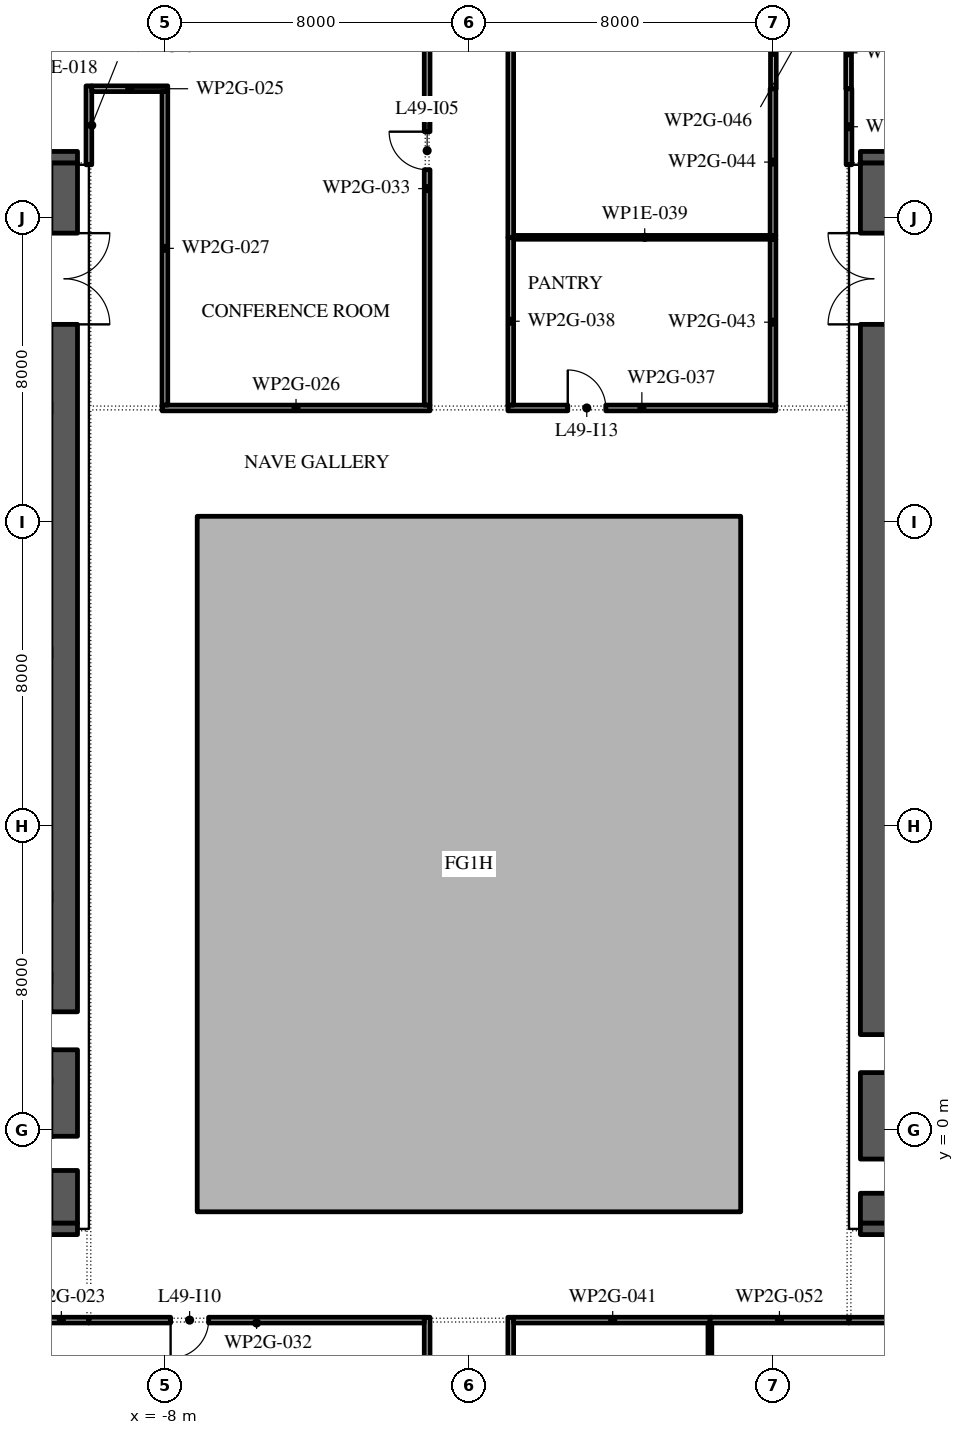
"""IFC4 building model, lengths in metres.
Left out: names, types, materials, properties, quantities, classifications, styles, units other than length and angle.
Written with IfcOpenShell. Run it as: python <this file> out.ifc"""

import sys

from ifc_helpers import new_model, si_unit, direction, frame, frame_2d, origin, place, context, subcontext, project, spatial, polyline, rectangle, outline, extrude, element, fill, save


model = new_model("IFC4")
c1 = context("Model", 3, precision=1e-05, world=origin(), true_north=direction((0.0, 1.0)))
c2 = subcontext(c1, "Body", "Model", "MODEL_VIEW")
j1 = project(units=[si_unit("LENGTHUNIT", "METRE"), si_unit("PLANEANGLEUNIT", "RADIAN")], contexts=[c1])
p1 = place(None, origin())
s1 = spatial("IfcSite", under=j1, at=p1, CompositionType="ELEMENT")
p2 = place(p1, origin())
s2 = spatial("IfcBuilding", under=s1, at=p2, CompositionType="ELEMENT")
p3 = place(p2, frame((0.0, 0.0, 222.0)))
s3 = spatial("IfcBuildingStorey", under=s2, at=p3, CompositionType="ELEMENT", Elevation=222.0)
p4 = place(p3, origin())
e1 = element("IfcWall", 1, at=p4, inside=s3, PredefinedType="STANDARD", context=c2, shape_type="SweptSolid", body=[
    extrude(outline(polyline([(-7.15, -2.15), (7.15, -2.15), (7.15, 16.15), (-7.15, 16.15), (-7.15, -2.15)]), holes=[polyline([(-7.0, -2.0), (-7.0, 16.0), (7.0, 16.0), (7.0, -2.0), (-7.0, -2.0)])]), origin(), (0.0, 0.0, 1.0), 3.75),
])
p5 = place(p3, frame((-10.65, -2.45, 0.0), z_axis=(0.0, 0.0, 1.0), x_axis=(0.0, 1.0, 0.0)))
e2 = element("IfcWall", 2, at=p5, inside=s3, PredefinedType="SHEAR", context=c2, shape_type="SweptSolid", body=[
    extrude(rectangle(XDim=27.9, YDim=0.7, at=frame_2d((13.95, 0.0))), origin(), (0.0, 0.0, 1.0), 3.75),
])
p6 = place(p5, frame((23.65, 0.0, 0.0)))
e3 = element("IfcOpeningElement", 3, at=p6, cuts=e2, PredefinedType="OPENING", context=c2, shape_type="SweptSolid", body=[
    extrude(rectangle(XDim=2.4, YDim=2.1, at=frame_2d((1.2, 1.05))), frame((0.0, 0.36, 0.0), z_axis=(0.0, -1.0, 0.0), x_axis=(1.0, 0.0, 0.0)), (0.0, 0.0, 1.0), 0.72),
])
p7 = place(p5, frame((1.387, 0.0, 0.0)))
e4 = element("IfcOpeningElement", 4, at=p7, cuts=e2, PredefinedType="OPENING", context=c2, shape_type="SweptSolid", body=[
    extrude(rectangle(XDim=0.9, YDim=2.1, at=frame_2d((0.45, 1.05))), frame((0.0, 0.36, 0.0), z_axis=(0.0, -1.0, 0.0), x_axis=(1.0, 0.0, 0.0)), (0.0, 0.0, 1.0), 0.72),
])
p8 = place(p5, frame((4.562, 0.0, 0.0)))
e5 = element("IfcOpeningElement", 5, at=p8, cuts=e2, PredefinedType="OPENING", context=c2, shape_type="SweptSolid", body=[
    extrude(rectangle(XDim=1.0, YDim=2.1, at=frame_2d((0.5, 1.05))), frame((0.0, 0.36, 0.0), z_axis=(0.0, -1.0, 0.0), x_axis=(1.0, 0.0, 0.0)), (0.0, 0.0, 1.0), 0.72),
])
for number, where, z_axis, x_axis in (
    (6, (-21.7, -2.6, 0.0), (0.0, 0.0, 1.0), (1.0, 0.0, 0.0)),
    (7, (-21.7, 25.6, 0.0), (0.0, 0.0, 1.0), (1.0, 0.0, 0.0)),
):
    element("IfcWall", number, at=place(p3, frame(where, z_axis=z_axis, x_axis=x_axis)), inside=s3, PredefinedType="SHEAR", context=c2, shape_type="SweptSolid", body=[
        extrude(rectangle(XDim=11.4, YDim=0.3, at=frame_2d((5.7, 0.0))), origin(), (0.0, 0.0, 1.0), 3.75),
    ])
p9 = place(p3, frame((10.65, -2.45, 0.0), z_axis=(0.0, 0.0, 1.0), x_axis=(0.0, 1.0, 0.0)))
e8 = element("IfcWall", 8, at=p9, inside=s3, PredefinedType="SHEAR", context=c2, shape_type="SweptSolid", body=[
    extrude(rectangle(XDim=27.9, YDim=0.7, at=frame_2d((13.95, 0.0))), origin(), (0.0, 0.0, 1.0), 3.75),
])
p10 = place(p9, frame((23.65, 0.0, 0.0)))
e9 = element("IfcOpeningElement", 9, at=p10, cuts=e8, PredefinedType="OPENING", context=c2, shape_type="SweptSolid", body=[
    extrude(rectangle(XDim=2.4, YDim=2.1, at=frame_2d((1.2, 1.05))), frame((0.0, 0.36, 0.0), z_axis=(0.0, -1.0, 0.0), x_axis=(1.0, 0.0, 0.0)), (0.0, 0.0, 1.0), 0.72),
])
p11 = place(p9, frame((0.788, 0.0, 0.0)))
e10 = element("IfcOpeningElement", 10, at=p11, cuts=e8, PredefinedType="OPENING", context=c2, shape_type="SweptSolid", body=[
    extrude(rectangle(XDim=0.9, YDim=2.1, at=frame_2d((0.45, 1.05))), frame((0.0, 0.36, 0.0), z_axis=(0.0, -1.0, 0.0), x_axis=(1.0, 0.0, 0.0)), (0.0, 0.0, 1.0), 0.72),
])
p12 = place(p9, frame((3.962, 0.0, 0.0)))
e11 = element("IfcOpeningElement", 11, at=p12, cuts=e8, PredefinedType="OPENING", context=c2, shape_type="SweptSolid", body=[
    extrude(rectangle(XDim=1.0, YDim=2.1, at=frame_2d((0.5, 1.05))), frame((0.0, 0.36, 0.0), z_axis=(0.0, -1.0, 0.0), x_axis=(1.0, 0.0, 0.0)), (0.0, 0.0, 1.0), 0.72),
])
for number, where, z_axis, x_axis in (
    (12, (10.3, -2.6, 0.0), (0.0, 0.0, 1.0), (1.0, 0.0, 0.0)),
    (13, (10.3, 25.6, 0.0), (0.0, 0.0, 1.0), (1.0, 0.0, 0.0)),
):
    element("IfcWall", number, at=place(p3, frame(where, z_axis=z_axis, x_axis=x_axis)), inside=s3, PredefinedType="SHEAR", context=c2, shape_type="SweptSolid", body=[
        extrude(rectangle(XDim=11.4, YDim=0.3, at=frame_2d((5.7, 0.0))), origin(), (0.0, 0.0, 1.0), 3.75),
    ])
p13 = place(p3, frame((-10.0, -5.0, 0.0), z_axis=(0.0, 0.0, 1.0), x_axis=(-1.0, 0.0, 0.0)))
e14 = element("IfcWall", 14, at=p13, inside=s3, PredefinedType="PARTITIONING", context=c2, shape_type="SweptSolid", body=[
    extrude(rectangle(XDim=1.45, YDim=0.15, at=frame_2d((0.725, 0.0))), origin(), (0.0, 0.0, 1.0), 3.75),
])
p14 = place(p3, frame((-10.0, 25.4, 0.0), z_axis=(0.0, 0.0, 1.0), x_axis=(0.0, 1.0, 0.0)))
e15 = element("IfcWall", 15, at=p14, inside=s3, PredefinedType="PARTITIONING", context=c2, shape_type="SweptSolid", body=[
    extrude(rectangle(XDim=2.075, YDim=0.15, at=frame_2d((1.038, 0.0))), origin(), (0.0, 0.0, 1.0), 3.75),
])
p15 = place(p3, frame((-9.925, 27.4, 0.0), z_axis=(0.0, 0.0, 1.0), x_axis=(1.0, 0.0, 0.0)))
e16 = element("IfcWall", 16, at=p15, inside=s3, PredefinedType="PARTITIONING", context=c2, shape_type="SweptSolid", body=[
    extrude(rectangle(XDim=2.0, YDim=0.15, at=frame_2d((1.0, 0.0))), origin(), (0.0, 0.0, 1.0), 3.75),
])
p16 = place(p3, frame((-8.075, 19.0, 0.0), z_axis=(0.0, 0.0, 1.0), x_axis=(1.0, 0.0, 0.0)))
e17 = element("IfcWall", 17, at=p16, inside=s3, PredefinedType="PARTITIONING", context=c2, shape_type="SweptSolid", body=[
    extrude(rectangle(XDim=7.05, YDim=0.15, at=frame_2d((3.525, 0.0))), origin(), (0.0, 0.0, 1.0), 3.75),
])
p17 = place(p3, frame((-8.0, 27.325, 0.0), z_axis=(0.0, 0.0, 1.0), x_axis=(0.0, -1.0, 0.0)))
e18 = element("IfcWall", 18, at=p17, inside=s3, PredefinedType="PARTITIONING", context=c2, shape_type="SweptSolid", body=[
    extrude(rectangle(XDim=8.25, YDim=0.15, at=frame_2d((4.125, 0.0))), origin(), (0.0, 0.0, 1.0), 3.75),
])
p18 = place(p3, frame((-1.1, -13.45, 0.0), z_axis=(0.0, 0.0, 1.0), x_axis=(0.0, 1.0, 0.0)))
e19 = element("IfcWall", 19, at=p18, inside=s3, PredefinedType="PARTITIONING", context=c2, shape_type="SweptSolid", body=[
    extrude(rectangle(XDim=8.525, YDim=0.15, at=frame_2d((4.262, 0.0))), origin(), (0.0, 0.0, 1.0), 3.75),
])
p19 = place(p3, frame((-1.175, -5.0, 0.0), z_axis=(0.0, 0.0, 1.0), x_axis=(-1.0, 0.0, 0.0)))
e20 = element("IfcWall", 20, at=p19, inside=s3, PredefinedType="PARTITIONING", context=c2, shape_type="SweptSolid", body=[
    extrude(rectangle(XDim=8.825, YDim=0.15, at=frame_2d((4.413, 0.0))), origin(), (0.0, 0.0, 1.0), 3.75),
])
p20 = place(p19, frame((5.675, 0.0, 0.0)))
e21 = element("IfcOpeningElement", 21, at=p20, cuts=e20, PredefinedType="OPENING", context=c2, shape_type="SweptSolid", body=[
    extrude(rectangle(XDim=1.0, YDim=2.1, at=frame_2d((0.5, 1.05))), frame((0.0, 0.085, 0.0), z_axis=(0.0, -1.0, 0.0), x_axis=(1.0, 0.0, 0.0)), (0.0, 0.0, 1.0), 0.17),
])
p21 = place(p3, frame((-1.1, 19.075, 0.0), z_axis=(0.0, 0.0, 1.0), x_axis=(0.0, 1.0, 0.0)))
e22 = element("IfcWall", 22, at=p21, inside=s3, PredefinedType="PARTITIONING", context=c2, shape_type="SweptSolid", body=[
    extrude(rectangle(XDim=11.395, YDim=0.15, at=frame_2d((5.698, 0.0))), origin(), (0.0, 0.0, 1.0), 3.75),
])
p22 = place(p21, frame((6.195, 0.0, 0.0)))
e23 = element("IfcOpeningElement", 23, at=p22, cuts=e22, PredefinedType="OPENING", context=c2, shape_type="SweptSolid", body=[
    extrude(rectangle(XDim=1.0, YDim=2.1, at=frame_2d((0.5, 1.05))), frame((0.0, 0.085, 0.0), z_axis=(0.0, -1.0, 0.0), x_axis=(1.0, 0.0, 0.0)), (0.0, 0.0, 1.0), 0.17),
])
p23 = place(p3, frame((1.1, -4.925, 0.0), z_axis=(0.0, 0.0, 1.0), x_axis=(0.0, -1.0, 0.0)))
e24 = element("IfcWall", 24, at=p23, inside=s3, PredefinedType="PARTITIONING", context=c2, shape_type="SweptSolid", body=[
    extrude(rectangle(XDim=11.345, YDim=0.15, at=frame_2d((5.672, 0.0))), origin(), (0.0, 0.0, 1.0), 3.75),
])
p24 = place(p23, frame((6.425, 0.0, 0.0)))
e25 = element("IfcOpeningElement", 25, at=p24, cuts=e24, PredefinedType="OPENING", context=c2, shape_type="SweptSolid", body=[
    extrude(rectangle(XDim=1.0, YDim=2.1, at=frame_2d((0.5, 1.05))), frame((0.0, 0.085, 0.0), z_axis=(0.0, -1.0, 0.0), x_axis=(1.0, 0.0, 0.0)), (0.0, 0.0, 1.0), 0.17),
])
p25 = place(p3, frame((1.025, 19.0, 0.0), z_axis=(0.0, 0.0, 1.0), x_axis=(1.0, 0.0, 0.0)))
e26 = element("IfcWall", 26, at=p25, inside=s3, PredefinedType="PARTITIONING", context=c2, shape_type="SweptSolid", body=[
    extrude(rectangle(XDim=7.05, YDim=0.15, at=frame_2d((3.525, 0.0))), origin(), (0.0, 0.0, 1.0), 3.75),
])
p26 = place(p25, frame((1.575, 0.0, 0.0)))
e27 = element("IfcOpeningElement", 27, at=p26, cuts=e26, PredefinedType="OPENING", context=c2, shape_type="SweptSolid", body=[
    extrude(rectangle(XDim=1.0, YDim=2.1, at=frame_2d((0.5, 1.05))), frame((0.0, 0.085, 0.0), z_axis=(0.0, -1.0, 0.0), x_axis=(1.0, 0.0, 0.0)), (0.0, 0.0, 1.0), 0.17),
])
p27 = place(p3, frame((1.1, 23.49, 0.0), z_axis=(0.0, 0.0, 1.0), x_axis=(0.0, -1.0, 0.0)))
e28 = element("IfcWall", 28, at=p27, inside=s3, PredefinedType="PARTITIONING", context=c2, shape_type="SweptSolid", body=[
    extrude(rectangle(XDim=4.415, YDim=0.15, at=frame_2d((2.208, 0.0))), origin(), (0.0, 0.0, 1.0), 3.75),
])
p28 = place(p3, frame((1.175, 23.49, 0.0), z_axis=(0.0, 0.0, 1.0), x_axis=(1.0, 0.0, 0.0)))
e29 = element("IfcWall", 29, at=p28, inside=s3, PredefinedType="PARTITIONING", context=c2, shape_type="SweptSolid", body=[
    extrude(rectangle(XDim=6.9, YDim=0.1, at=frame_2d((3.45, 0.0))), origin(), (0.0, 0.0, 1.0), 3.75),
])
p29 = place(p3, frame((1.1, 41.778, 0.0), z_axis=(0.0, 0.0, 1.0), x_axis=(0.0, -1.0, 0.0)))
e30 = element("IfcWall", 30, at=p29, inside=s3, PredefinedType="PARTITIONING", context=c2, shape_type="SweptSolid", body=[
    extrude(rectangle(XDim=18.288, YDim=0.15, at=frame_2d((9.144, 0.0))), origin(), (0.0, 0.0, 1.0), 3.75),
])
p30 = place(p29, frame((10.388, 0.0, 0.0)))
e31 = element("IfcOpeningElement", 31, at=p30, cuts=e30, PredefinedType="OPENING", context=c2, shape_type="SweptSolid", body=[
    extrude(rectangle(XDim=1.0, YDim=2.1, at=frame_2d((0.5, 1.05))), frame((0.0, 0.085, 0.0), z_axis=(0.0, -1.0, 0.0), x_axis=(1.0, 0.0, 0.0)), (0.0, 0.0, 1.0), 0.17),
])
p31 = place(p3, frame((6.39, -5.0, 0.0), z_axis=(0.0, 0.0, 1.0), x_axis=(-1.0, 0.0, 0.0)))
e32 = element("IfcWall", 32, at=p31, inside=s3, PredefinedType="PARTITIONING", context=c2, shape_type="SweptSolid", body=[
    extrude(rectangle(XDim=5.215, YDim=0.15, at=frame_2d((2.607, 0.0))), origin(), (0.0, 0.0, 1.0), 3.75),
])
p32 = place(p3, frame((6.34, -5.075, 0.0), z_axis=(0.0, 0.0, 1.0), x_axis=(0.0, -1.0, 0.0)))
e33 = element("IfcWall", 33, at=p32, inside=s3, PredefinedType="PARTITIONING", context=c2, shape_type="SweptSolid", body=[
    extrude(rectangle(XDim=9.986, YDim=0.1, at=frame_2d((4.993, 0.0))), origin(), (0.0, 0.0, 1.0), 3.75),
])
p33 = place(p3, frame((8.0, 19.075, 0.0), z_axis=(0.0, 0.0, 1.0), x_axis=(0.0, 1.0, 0.0)))
e34 = element("IfcWall", 34, at=p33, inside=s3, PredefinedType="PARTITIONING", context=c2, shape_type="SweptSolid", body=[
    extrude(rectangle(XDim=4.365, YDim=0.15, at=frame_2d((2.183, 0.0))), origin(), (0.0, 0.0, 1.0), 3.75),
])
p34 = place(p3, frame((8.0, 23.54, 0.0), z_axis=(0.0, 0.0, 1.0), x_axis=(0.0, 1.0, 0.0)))
e35 = element("IfcWall", 35, at=p34, inside=s3, PredefinedType="PARTITIONING", context=c2, shape_type="SweptSolid", body=[
    extrude(rectangle(XDim=3.86, YDim=0.15, at=frame_2d((1.93, 0.0))), origin(), (0.0, 0.0, 1.0), 3.75),
])
p35 = place(p3, frame((8.01, 27.4, 0.0), z_axis=(0.0, 0.0, 1.0), x_axis=(0.0, 1.0, 0.0)))
e36 = element("IfcWall", 36, at=p35, inside=s3, PredefinedType="PARTITIONING", context=c2, shape_type="SweptSolid", body=[
    extrude(rectangle(XDim=1.915, YDim=0.15, at=frame_2d((0.958, 0.0))), origin(), (0.0, 0.0, 1.0), 3.75),
])
p36 = place(p3, frame((9.99, 29.29, 0.0), z_axis=(0.0, 0.0, 1.0), x_axis=(0.0, -1.0, 0.0)))
e37 = element("IfcWall", 37, at=p36, inside=s3, PredefinedType="PARTITIONING", context=c2, shape_type="SweptSolid", body=[
    extrude(rectangle(XDim=1.89, YDim=0.15, at=frame_2d((0.945, 0.0))), origin(), (0.0, 0.0, 1.0), 3.75),
])
p37 = place(p3, frame((10.0, -5.0, 0.0), z_axis=(0.0, 0.0, 1.0), x_axis=(-1.0, 0.0, 0.0)))
e38 = element("IfcWall", 38, at=p37, inside=s3, PredefinedType="PARTITIONING", context=c2, shape_type="SweptSolid", body=[
    extrude(rectangle(XDim=3.66, YDim=0.15, at=frame_2d((1.83, 0.0))), origin(), (0.0, 0.0, 1.0), 3.75),
])
p38 = place(p3, frame((10.0, 27.4, 0.0), z_axis=(0.0, 0.0, 1.0), x_axis=(0.0, -1.0, 0.0)))
e39 = element("IfcWall", 39, at=p38, inside=s3, PredefinedType="PARTITIONING", context=c2, shape_type="SweptSolid", body=[
    extrude(rectangle(XDim=2.0, YDim=0.15, at=frame_2d((1.0, 0.0))), origin(), (0.0, 0.0, 1.0), 3.75),
])
p39 = place(p3, frame((22.57, -5.0, 0.0), z_axis=(0.0, 0.0, 1.0), x_axis=(-1.0, 0.0, 0.0)))
e40 = element("IfcWall", 40, at=p39, inside=s3, PredefinedType="PARTITIONING", context=c2, shape_type="SweptSolid", body=[
    extrude(rectangle(XDim=12.57, YDim=0.15, at=frame_2d((6.285, 0.0))), origin(), (0.0, 0.0, 1.0), 3.75),
])
p40 = place(p39, frame((8.42, 0.0, 0.0)))
e41 = element("IfcOpeningElement", 41, at=p40, cuts=e40, PredefinedType="OPENING", context=c2, shape_type="SweptSolid", body=[
    extrude(rectangle(XDim=1.0, YDim=2.1, at=frame_2d((0.5, 1.05))), frame((0.0, 0.085, 0.0), z_axis=(0.0, -1.0, 0.0), x_axis=(1.0, 0.0, 0.0)), (0.0, 0.0, 1.0), 0.17),
])
p41 = place(p6, frame((2.4, 0.0, 0.0), z_axis=(0.0, 0.0, 1.0), x_axis=(-1.0, 0.0, 0.0)))
e42 = element("IfcDoor", 42, at=p41, inside=s3, OperationType="DOUBLE_DOOR_SINGLE_SWING", PredefinedType="DOOR", context=c2, shape_type="SweptSolid", body=[
    extrude(rectangle(XDim=2.4, YDim=2.1, at=frame_2d((1.2, 1.05))), frame((0.0, 0.025, 0.0), z_axis=(0.0, -1.0, 0.0), x_axis=(1.0, 0.0, 0.0)), (0.0, 0.0, 1.0), 0.05),
])
fill(e3, e42)
p42 = place(p10, origin())
e43 = element("IfcDoor", 43, at=p42, inside=s3, OperationType="DOUBLE_DOOR_SINGLE_SWING", PredefinedType="DOOR", context=c2, shape_type="SweptSolid", body=[
    extrude(rectangle(XDim=2.4, YDim=2.1, at=frame_2d((1.2, 1.05))), frame((0.0, 0.025, 0.0), z_axis=(0.0, -1.0, 0.0), x_axis=(1.0, 0.0, 0.0)), (0.0, 0.0, 1.0), 0.05),
])
fill(e9, e43)
p43 = place(p22, origin())
e44 = element("IfcDoor", 44, at=p43, inside=s3, OperationType="SINGLE_SWING_LEFT", PredefinedType="DOOR", context=c2, shape_type="SweptSolid", body=[
    extrude(rectangle(XDim=1.0, YDim=2.1, at=frame_2d((0.5, 1.05))), frame((0.0, 0.025, 0.0), z_axis=(0.0, -1.0, 0.0), x_axis=(1.0, 0.0, 0.0)), (0.0, 0.0, 1.0), 0.05),
])
fill(e23, e44)
p44 = place(p20, origin())
e45 = element("IfcDoor", 45, at=p44, inside=s3, OperationType="SINGLE_SWING_LEFT", PredefinedType="DOOR", context=c2, shape_type="SweptSolid", body=[
    extrude(rectangle(XDim=1.0, YDim=2.1, at=frame_2d((0.5, 1.05))), frame((0.0, 0.025, 0.0), z_axis=(0.0, -1.0, 0.0), x_axis=(1.0, 0.0, 0.0)), (0.0, 0.0, 1.0), 0.05),
])
fill(e21, e45)
p45 = place(p26, origin())
e46 = element("IfcDoor", 46, at=p45, inside=s3, OperationType="SINGLE_SWING_RIGHT", PredefinedType="DOOR", context=c2, shape_type="SweptSolid", body=[
    extrude(rectangle(XDim=1.0, YDim=2.1, at=frame_2d((0.5, 1.05))), frame((0.0, 0.025, 0.0), z_axis=(0.0, -1.0, 0.0), x_axis=(1.0, 0.0, 0.0)), (0.0, 0.0, 1.0), 0.05),
])
fill(e27, e46)
save(model, sys.argv[1])
